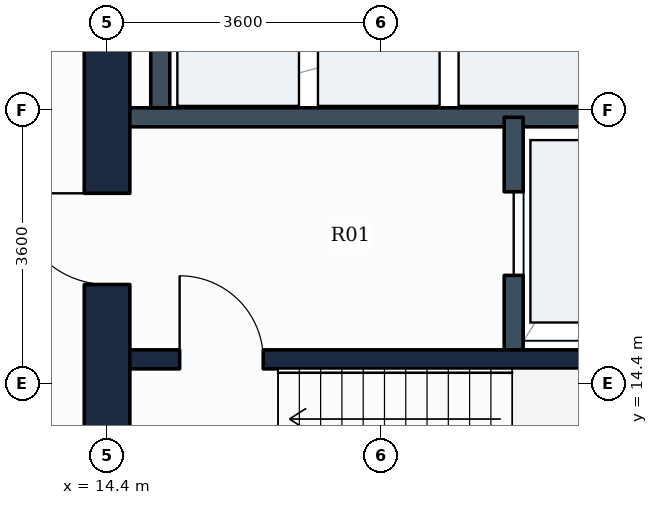
"""IFC4 building model, lengths in metres.
Left out: names, types, materials, properties, quantities, classifications, styles, units other than length and angle.
Written with IfcOpenShell. Run it as: python <this file> out.ifc"""

import sys

from ifc_helpers import new_model, si_unit, direction, frame, frame_2d, origin, place, context, subcontext, project, spatial, rectangle, extrude, element, fill, save


model = new_model("IFC4")
c1 = context("Model", 3, precision=1e-05, world=origin(), true_north=direction((0.0, 1.0)))
c2 = subcontext(c1, "Body", "Model", "MODEL_VIEW")
j1 = project(units=[si_unit("LENGTHUNIT", "METRE"), si_unit("PLANEANGLEUNIT", "RADIAN")], contexts=[c1])
p1 = place(None, origin())
s1 = spatial("IfcSite", under=j1, at=p1, CompositionType="ELEMENT")
p2 = place(p1, origin())
s2 = spatial("IfcBuilding", under=s1, at=p2, CompositionType="ELEMENT")
p3 = place(p2, frame((0.0, 0.0, 107.4)))
s3 = spatial("IfcBuildingStorey", under=s2, at=p3, CompositionType="ELEMENT", Elevation=107.4)
p4 = place(p3, frame((14.4, 10.8, 0.0), z_axis=(0.0, 0.0, 1.0), x_axis=(0.0, 1.0, 0.0)))
e1 = element("IfcWall", 1, at=p4, inside=s3, PredefinedType="SHEAR", context=c2, shape_type="SweptSolid", body=[
    extrude(rectangle(XDim=14.4, YDim=0.6, at=frame_2d((7.2, 0.0))), origin(), (0.0, 0.0, 1.0), 3.65),
])
p5 = place(p4, frame((11.05, 0.0, 0.0)))
e2 = element("IfcOpeningElement", 2, at=p5, cuts=e1, PredefinedType="OPENING", context=c2, shape_type="SweptSolid", body=[
    extrude(rectangle(XDim=1.1, YDim=2.1, at=frame_2d((0.55, 1.05))), frame((0.0, 0.31, 0.0), z_axis=(0.0, -1.0, 0.0), x_axis=(1.0, 0.0, 0.0)), (0.0, 0.0, 1.0), 0.62),
])
p6 = place(p4, frame((4.9, 0.0, 0.0)))
e3 = element("IfcOpeningElement", 3, at=p6, cuts=e1, PredefinedType="OPENING", context=c2, shape_type="SweptSolid", body=[
    extrude(rectangle(XDim=1.2, YDim=2.1, at=frame_2d((0.6, 1.05))), frame((0.0, 0.31, 0.0), z_axis=(0.0, -1.0, 0.0), x_axis=(1.0, 0.0, 0.0)), (0.0, 0.0, 1.0), 0.62),
])
p7 = place(p3, frame((14.7, 14.715, 0.0), z_axis=(0.0, 0.0, 1.0), x_axis=(1.0, 0.0, 0.0)))
e4 = element("IfcWall", 4, at=p7, inside=s3, PredefinedType="SHEAR", context=c2, shape_type="SweptSolid", body=[
    extrude(rectangle(XDim=8.65, YDim=0.25, at=frame_2d((4.325, 0.0))), origin(), (0.0, 0.0, 1.0), 3.65),
])
p8 = place(p7, frame((0.655, 0.0, 0.0)))
e5 = element("IfcOpeningElement", 5, at=p8, cuts=e4, PredefinedType="OPENING", context=c2, shape_type="SweptSolid", body=[
    extrude(rectangle(XDim=1.1, YDim=2.1, at=frame_2d((0.55, 1.05))), frame((0.0, 0.135, 0.0), z_axis=(0.0, -1.0, 0.0), x_axis=(1.0, 0.0, 0.0)), (0.0, 0.0, 1.0), 0.27),
])
p9 = place(p3, frame((14.65, 17.9, 0.0), z_axis=(0.0, 0.0, 1.0), x_axis=(1.0, 0.0, 0.0)))
e6 = element("IfcWall", 6, at=p9, inside=s3, PredefinedType="PARTITIONING", context=c2, shape_type="SweptSolid", body=[
    extrude(rectangle(XDim=7.15, YDim=0.25, at=frame_2d((3.575, 0.0))), origin(), (0.0, 0.0, 1.0), 3.635),
])
p10 = place(p3, frame((19.75, 14.84, 0.0), z_axis=(0.0, 0.0, 1.0), x_axis=(0.0, 1.0, 0.0)))
e7 = element("IfcWall", 7, at=p10, inside=s3, PredefinedType="PARTITIONING", context=c2, shape_type="SweptSolid", body=[
    extrude(rectangle(XDim=3.06, YDim=0.25, at=frame_2d((1.53, 0.0))), origin(), (0.0, 0.0, 1.0), 3.635),
])
p11 = place(p10, frame((0.98, 0.0, 0.0)))
e8 = element("IfcOpeningElement", 8, at=p11, cuts=e7, PredefinedType="OPENING", context=c2, shape_type="SweptSolid", body=[
    extrude(rectangle(XDim=1.1, YDim=2.1, at=frame_2d((0.55, 1.05))), frame((0.0, 0.135, 0.0), z_axis=(0.0, -1.0, 0.0), x_axis=(1.0, 0.0, 0.0)), (0.0, 0.0, 1.0), 0.27),
])
p12 = place(p3, frame((15.1, 18.025, 0.0), z_axis=(0.0, 0.0, 1.0), x_axis=(0.0, 1.0, 0.0)))
e9 = element("IfcWall", 9, at=p12, inside=s3, PredefinedType="PARTITIONING", context=c2, shape_type="SweptSolid", body=[
    extrude(rectangle(XDim=1.975, YDim=0.25, at=frame_2d((0.988, 0.0))), origin(), (0.0, 0.0, 1.0), 3.635),
])
p13 = place(p8, origin())
e10 = element("IfcDoor", 10, at=p13, inside=s3, OperationType="SINGLE_SWING_LEFT", PredefinedType="DOOR", context=c2, shape_type="SweptSolid", body=[
    extrude(rectangle(XDim=1.1, YDim=2.1, at=frame_2d((0.55, 1.05))), frame((0.0, 0.025, 0.0), z_axis=(0.0, -1.0, 0.0), x_axis=(1.0, 0.0, 0.0)), (0.0, 0.0, 1.0), 0.05),
])
fill(e5, e10)
p14 = place(p11, origin())
e11 = element("IfcDoor", 11, at=p14, inside=s3, OperationType="SLIDING_TO_LEFT", PredefinedType="DOOR", context=c2, shape_type="SweptSolid", body=[
    extrude(rectangle(XDim=1.1, YDim=2.1, at=frame_2d((0.55, 1.05))), frame((0.0, 0.025, 0.0), z_axis=(0.0, -1.0, 0.0), x_axis=(1.0, 0.0, 0.0)), (0.0, 0.0, 1.0), 0.05),
])
fill(e8, e11)
p15 = place(p6, origin())
e12 = element("IfcDoor", 12, at=p15, inside=s3, OperationType="SINGLE_SWING_RIGHT", PredefinedType="DOOR", context=c2, shape_type="SweptSolid", body=[
    extrude(rectangle(XDim=1.2, YDim=2.1, at=frame_2d((0.6, 1.05))), frame((0.0, 0.025, 0.0), z_axis=(0.0, -1.0, 0.0), x_axis=(1.0, 0.0, 0.0)), (0.0, 0.0, 1.0), 0.05),
])
fill(e3, e12)
save(model, sys.argv[1])
